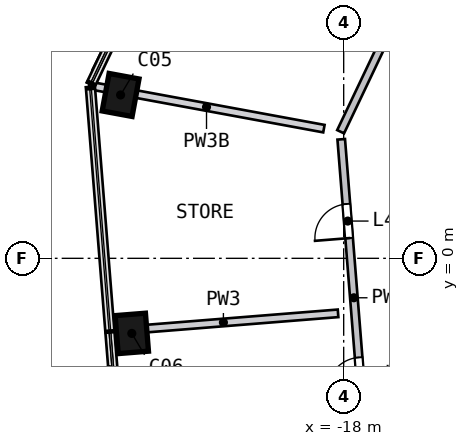
"""IFC4 building model, lengths in metres.
Left out: names, types, materials, properties, quantities, classifications, styles, units other than length and angle.
Written with IfcOpenShell. Run it as: python <this file> out.ifc"""

import sys

from ifc_helpers import new_model, si_unit, direction, frame, frame_2d, origin, origin_2d, place, context, subcontext, project, spatial, rectangle, extrude, element, fill, save


model = new_model("IFC4")
c1 = context("Model", 3, precision=1e-05, world=origin(), true_north=direction((0.0, 1.0)))
c2 = subcontext(c1, "Body", "Model", "MODEL_VIEW")
j1 = project(units=[si_unit("LENGTHUNIT", "METRE"), si_unit("PLANEANGLEUNIT", "RADIAN")], contexts=[c1])
p1 = place(None, origin())
s1 = spatial("IfcSite", under=j1, at=p1, CompositionType="ELEMENT")
p2 = place(p1, origin())
s2 = spatial("IfcBuilding", under=s1, at=p2, CompositionType="ELEMENT")
p3 = place(p2, frame((0.0, 0.0, 175.0)))
s3 = spatial("IfcBuildingStorey", under=s2, at=p3, CompositionType="ELEMENT", Elevation=175.0)
p4 = place(p3, frame((-23.853, 4.395, 0.0), z_axis=(-0.014009031, -0.079747708, 0.996716635), x_axis=(0.180722075, 0.980195922, 0.08096596)))
e1 = element("IfcColumn", 1, at=p4, inside=s3, PredefinedType="COLUMN", context=c2, shape_type="SweptSolid", body=[
    extrude(rectangle(XDim=1.0, YDim=0.8, at=origin_2d()), origin(), (0.0, 0.0, 1.0), 4.705),
])
p5 = place(p3, frame((-23.583, -1.881, 0.0), z_axis=(0.006953716, -0.078722297, 0.996872332), x_axis=(0.079340262, -0.993710224, -0.079026028)))
e2 = element("IfcColumn", 2, at=p5, inside=s3, PredefinedType="COLUMN", context=c2, shape_type="SweptSolid", body=[
    extrude(rectangle(XDim=1.0, YDim=0.8, at=origin_2d()), origin(), (0.0, 0.0, 1.0), 4.705),
])
p6 = place(p3, frame((-17.34, -5.956, 0.0), z_axis=(0.0, 0.0, 1.0), x_axis=(-0.079507867, 0.996834238, 0.0)))
e3 = element("IfcWall", 3, at=p6, inside=s3, PredefinedType="SOLIDWALL", context=c2, shape_type="SweptSolid", body=[
    extrude(rectangle(XDim=9.117, YDim=0.2, at=frame_2d((4.558, 0.0))), origin(), (0.0, 0.0, 1.0), 4.69),
])
p7 = place(p6, frame((6.508, 0.0, 0.0)))
e4 = element("IfcOpeningElement", 4, at=p7, cuts=e3, PredefinedType="OPENING", context=c2, shape_type="SweptSolid", body=[
    extrude(rectangle(XDim=0.9, YDim=2.1, at=frame_2d((0.45, 1.05))), frame((0.0, 0.11, 0.0), z_axis=(0.0, -1.0, 0.0), x_axis=(1.0, 0.0, 0.0)), (0.0, 0.0, 1.0), 0.22),
])
p8 = place(p6, frame((2.458, 0.0, 0.0)))
e5 = element("IfcOpeningElement", 5, at=p8, cuts=e3, PredefinedType="OPENING", context=c2, shape_type="SweptSolid", body=[
    extrude(rectangle(XDim=0.9, YDim=2.1, at=frame_2d((0.45, 1.05))), frame((0.0, 0.11, 0.0), z_axis=(0.0, -1.0, 0.0), x_axis=(1.0, 0.0, 0.0)), (0.0, 0.0, 1.0), 0.22),
])
p9 = place(p6, frame((0.2, 0.0, 0.0)))
e6 = element("IfcOpeningElement", 6, at=p9, cuts=e3, PredefinedType="OPENING", context=c2, shape_type="SweptSolid", body=[
    extrude(rectangle(XDim=0.9, YDim=2.1, at=frame_2d((0.45, 1.05))), frame((0.0, 0.11, 0.0), z_axis=(0.0, -1.0, 0.0), x_axis=(1.0, 0.0, 0.0)), (0.0, 0.0, 1.0), 0.22),
])
p10 = place(p3, frame((-18.08, 3.332, 0.0), z_axis=(0.0, 0.0, 1.0), x_axis=(0.429559111, 0.903038742, 0.0)))
e7 = element("IfcWall", 7, at=p10, inside=s3, PredefinedType="SOLIDWALL", context=c2, shape_type="SweptSolid", body=[
    extrude(rectangle(XDim=9.517, YDim=0.2, at=frame_2d((4.758, 0.0))), origin(), (0.0, 0.0, 1.0), 4.69),
])
p11 = place(p10, frame((6.25, 0.0, 0.0)))
e8 = element("IfcOpeningElement", 8, at=p11, cuts=e7, PredefinedType="OPENING", context=c2, shape_type="SweptSolid", body=[
    extrude(rectangle(XDim=1.8, YDim=2.1, at=frame_2d((0.9, 1.05))), frame((0.0, 0.11, 0.0), z_axis=(0.0, -1.0, 0.0), x_axis=(1.0, 0.0, 0.0)), (0.0, 0.0, 1.0), 0.22),
])
p12 = place(p3, frame((-18.52, 3.413, 0.0), z_axis=(0.0, 0.0, 1.0), x_axis=(-0.983449362, 0.181183202, 0.0)))
e9 = element("IfcWall", 9, at=p12, inside=s3, PredefinedType="SOLIDWALL", context=c2, shape_type="SweptSolid", body=[
    extrude(rectangle(XDim=6.282, YDim=0.2, at=frame_2d((3.141, 0.0))), origin(), (0.0, 0.0, 1.0), 4.19),
])
p13 = place(p3, frame((-18.148, -1.448, 0.0), z_axis=(0.0, 0.0, 1.0), x_axis=(-0.996834616, -0.079503137, 0.0)))
e10 = element("IfcWall", 10, at=p13, inside=s3, PredefinedType="SOLIDWALL", context=c2, shape_type="SweptSolid", body=[
    extrude(rectangle(XDim=6.052, YDim=0.2, at=frame_2d((3.026, 0.0))), origin(), (0.0, 0.0, 1.0), 4.69),
])
p14 = place(p7, origin())
e11 = element("IfcDoor", 11, at=p14, inside=s3, OperationType="SINGLE_SWING_LEFT", PredefinedType="DOOR", context=c2, shape_type="SweptSolid", body=[
    extrude(rectangle(XDim=0.9, YDim=2.1, at=frame_2d((0.45, 1.05))), frame((0.0, 0.025, 0.0), z_axis=(0.0, -1.0, 0.0), x_axis=(1.0, 0.0, 0.0)), (0.0, 0.0, 1.0), 0.05),
])
fill(e4, e11)
p15 = place(p8, origin())
e12 = element("IfcDoor", 12, at=p15, inside=s3, OperationType="SINGLE_SWING_LEFT", PredefinedType="DOOR", context=c2, shape_type="SweptSolid", body=[
    extrude(rectangle(XDim=0.9, YDim=2.1, at=frame_2d((0.45, 1.05))), frame((0.0, 0.025, 0.0), z_axis=(0.0, -1.0, 0.0), x_axis=(1.0, 0.0, 0.0)), (0.0, 0.0, 1.0), 0.05),
])
fill(e5, e12)
save(model, sys.argv[1])
